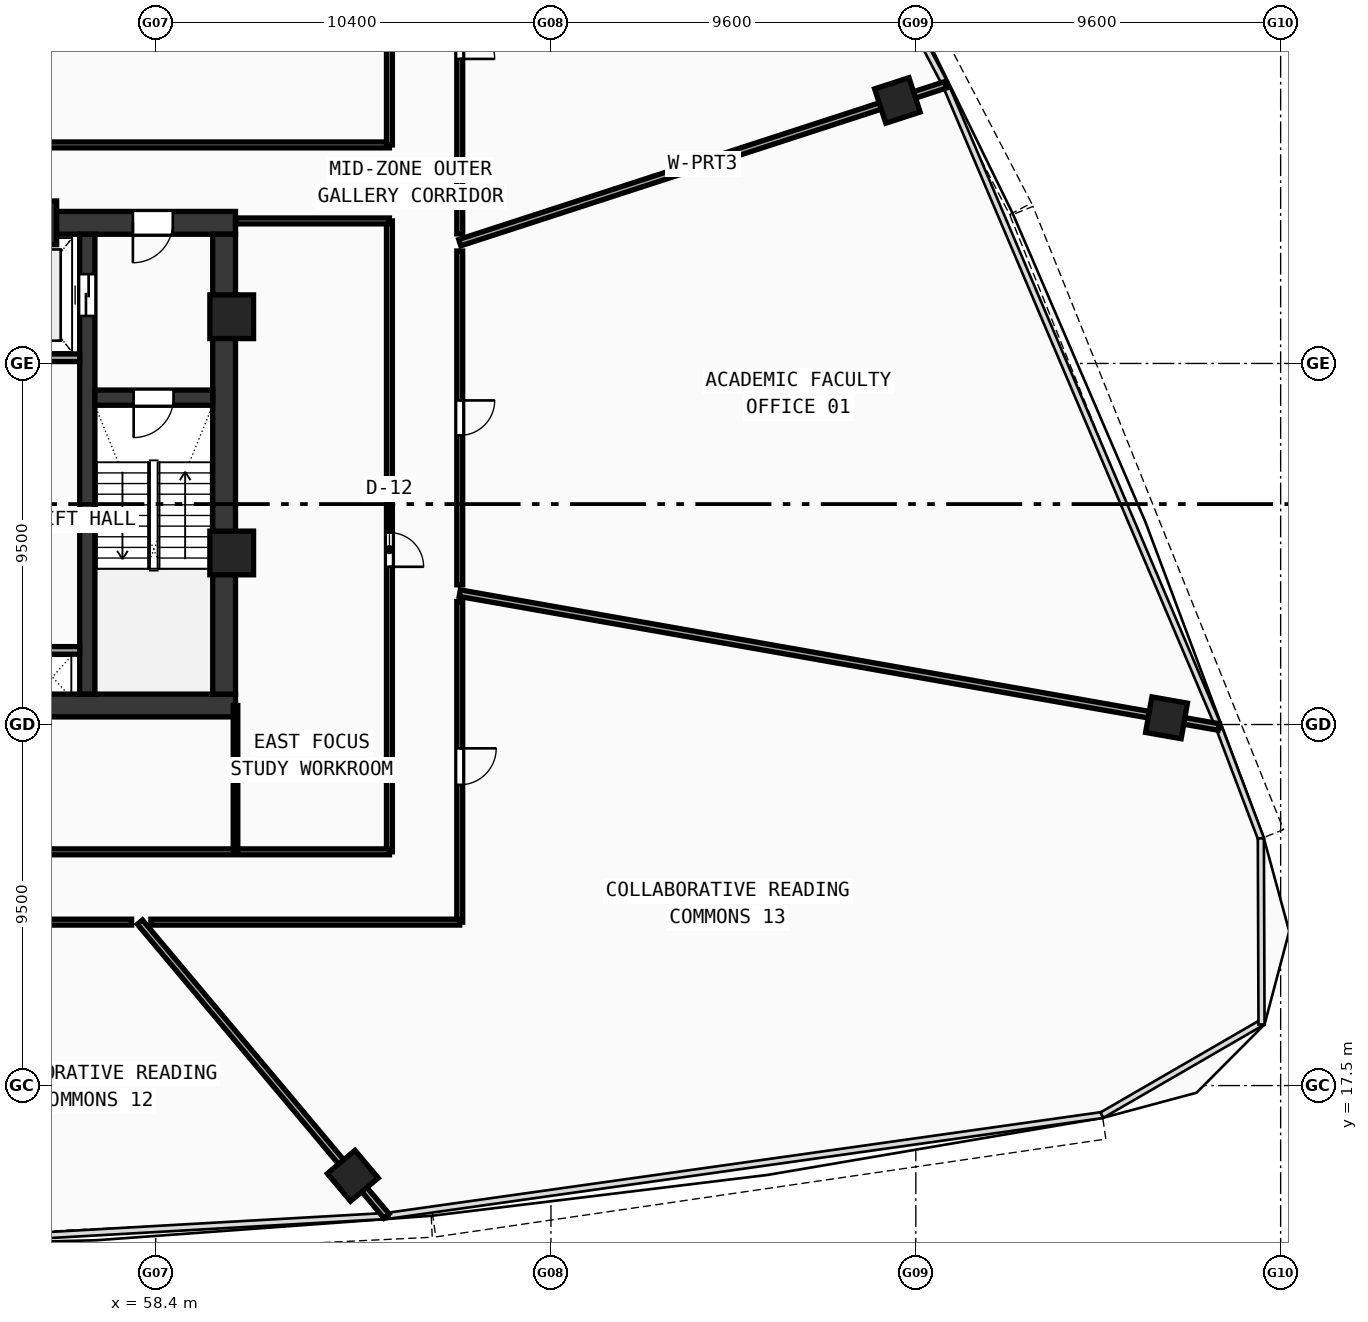
"""IFC4 building model, lengths in metres.
Left out: names, types, materials, properties, quantities, classifications, styles, units other than length and angle.
Written with IfcOpenShell. Run it as: python <this file> out.ifc"""

import sys

from ifc_helpers import new_model, si_unit, direction, frame, frame_2d, origin, origin_with_axes, origin_2d, place, context, subcontext, project, spatial, rectangle, hollow_rectangle, extrude, source, transform, mapped, element, fill, save


model = new_model("IFC4")
c1 = context("Model", 3, precision=1e-05, world=origin(), true_north=direction((0.0, 1.0)))
c2 = subcontext(c1, "Body", "Model", "MODEL_VIEW")
j1 = project(units=[si_unit("LENGTHUNIT", "METRE"), si_unit("PLANEANGLEUNIT", "RADIAN")], contexts=[c1])
p1 = place(None, origin())
s1 = spatial("IfcSite", under=j1, at=p1, CompositionType="ELEMENT")
p2 = place(p1, origin())
s2 = spatial("IfcBuilding", under=s1, at=p2, CompositionType="ELEMENT")
p3 = place(p2, frame((0.0, 0.0, 151.91)))
s3 = spatial("IfcBuildingStorey", under=s2, at=p3, CompositionType="ELEMENT", Elevation=151.91)
p4 = place(p3, frame((35.5, 27.5, 0.0), z_axis=(0.0, 0.0, 1.0), x_axis=(1.0, 0.0, 0.0)))
e1 = element("IfcWall", 1, at=p4, inside=s3, PredefinedType="SHEAR", context=c2, shape_type="SweptSolid", body=[
    extrude(rectangle(XDim=25.0, YDim=0.6, at=frame_2d((12.5, 0.0))), origin(), (0.0, 0.0, 1.0), 3.42),
])
p5 = place(p3, frame((49.2, 40.2, 0.0), z_axis=(0.0, 0.0, 1.0), x_axis=(1.0, 0.0, 0.0)))
e2 = element("IfcWall", 2, at=p5, inside=s3, PredefinedType="SHEAR", context=c2, shape_type="SweptSolid", body=[
    extrude(rectangle(XDim=11.3, YDim=0.6, at=frame_2d((5.65, 0.0))), origin(), (0.0, 0.0, 1.0), 3.42),
])
p6 = place(p5, frame((8.6, 0.0, 0.0)))
e3 = element("IfcOpeningElement", 3, at=p6, cuts=e2, PredefinedType="OPENING", context=c2, shape_type="SweptSolid", body=[
    extrude(rectangle(XDim=1.05, YDim=2.1, at=frame_2d((0.525, 1.05))), frame((0.0, 0.31, 0.0), z_axis=(0.0, -1.0, 0.0), x_axis=(1.0, 0.0, 0.0)), (0.0, 0.0, 1.0), 0.62),
])
p7 = place(p3, frame((60.2, 27.8, 0.0), z_axis=(0.0, 0.0, 1.0), x_axis=(0.0, 1.0, 0.0)))
e4 = element("IfcWall", 4, at=p7, inside=s3, PredefinedType="SHEAR", context=c2, shape_type="SweptSolid", body=[
    extrude(rectangle(XDim=12.1, YDim=0.6, at=frame_2d((6.05, 0.0))), origin(), (0.0, 0.0, 1.0), 3.42),
])
p8 = place(p3, frame((56.6, 27.8, 0.0), z_axis=(0.0, 0.0, 1.0), x_axis=(0.0, 1.0, 0.0)))
e5 = element("IfcWall", 5, at=p8, inside=s3, PredefinedType="SHEAR", context=c2, shape_type="SweptSolid", body=[
    extrude(rectangle(XDim=12.1, YDim=0.4, at=frame_2d((6.05, 0.0))), origin(), (0.0, 0.0, 1.0), 3.42),
])
p9 = place(p8, frame((9.95, 0.0, 0.0)))
e6 = element("IfcOpeningElement", 6, at=p9, cuts=e5, PredefinedType="OPENING", context=c2, shape_type="SweptSolid", body=[
    extrude(rectangle(XDim=1.1, YDim=2.1, at=frame_2d((0.55, 1.05))), frame((0.0, 0.21, 0.0), z_axis=(0.0, -1.0, 0.0), x_axis=(1.0, 0.0, 0.0)), (0.0, 0.0, 1.0), 0.42),
])
p10 = place(p3, frame((56.8, 35.6, 0.0), z_axis=(0.0, 0.0, 1.0), x_axis=(1.0, 0.0, 0.0)))
e7 = element("IfcWall", 7, at=p10, inside=s3, PredefinedType="SHEAR", context=c2, shape_type="SweptSolid", body=[
    extrude(rectangle(XDim=3.1, YDim=0.4, at=frame_2d((1.55, 0.0))), origin(), (0.0, 0.0, 1.0), 3.42),
])
p11 = place(p10, frame((1.02, 0.0, 0.0)))
e8 = element("IfcOpeningElement", 8, at=p11, cuts=e7, PredefinedType="OPENING", context=c2, shape_type="SweptSolid", body=[
    extrude(rectangle(XDim=1.05, YDim=2.1, at=frame_2d((0.525, 1.05))), frame((0.0, 0.21, 0.0), z_axis=(0.0, -1.0, 0.0), x_axis=(1.0, 0.0, 0.0)), (0.0, 0.0, 1.0), 0.42),
])
m1 = source(origin(), c2, "Body", "SweptSolid", [
    extrude(hollow_rectangle(XDim=1.15, YDim=1.15, WallThickness=0.048, at=origin_2d()), origin(), (0.0, 0.0, 1.0), 3.68),
])
for number, where, z_axis, x_axis in (
    (9, (60.4, 31.513, -0.26), (0.0, 0.0, 1.0), (1.0, 0.0, 0.0)),
    (10, (60.4, 37.729, -0.26), (0.0, 0.0, 1.0), (1.0, 0.0, 0.0)),
    (11, (55.219, 40.2, -0.26), (0.0, 0.0, 1.0), (1.0, 0.0, 0.0)),
):
    element("IfcColumn", number, at=place(p3, frame(where, z_axis=z_axis, x_axis=x_axis)), inside=s3, PredefinedType="COLUMN", context=c2, shape_type="MappedRepresentation", body=[
        mapped(m1, transform((0.0, 0.0, 0.0), scale=1.0)),
    ])
m2 = source(origin(), c2, "Body", "SweptSolid", [
    extrude(hollow_rectangle(XDim=0.95, YDim=0.95, WallThickness=0.04, at=origin_2d()), origin(), (0.0, 0.0, 1.0), 3.68),
])
for number, where, z_axis, x_axis in (
    (12, (63.585, 15.126, -0.26), (0.0, 0.0, 1.0), (0.766, 0.643, 0.0)),
    (13, (84.997, 27.177, -0.26), (0.0, 0.0, 1.0), (0.174, 0.985, 0.0)),
    (14, (77.915, 43.42, -0.26), (0.0, 0.0, 1.0), (-0.309, 0.951, 0.0)),
):
    element("IfcColumn", number, at=place(p3, frame(where, z_axis=z_axis, x_axis=x_axis)), inside=s3, PredefinedType="COLUMN", context=c2, shape_type="MappedRepresentation", body=[
        mapped(m2, transform((0.0, 0.0, 0.0), scale=1.0)),
    ])
p12 = place(p3, frame((53.68, 36.65, 0.0), z_axis=(0.0, 0.0, 1.0), x_axis=(1.0, 0.0, 0.0)))
e15 = element("IfcWall", 15, at=p12, inside=s3, PredefinedType="SOLIDWALL", context=c2, shape_type="SweptSolid", body=[
    extrude(rectangle(XDim=2.72, YDim=0.2, at=frame_2d((1.36, 0.0))), origin(), (0.0, 0.0, 1.0), 3.42),
])
p13 = place(p3, frame((55.12, 28.95, 0.0), z_axis=(0.0, 0.0, 1.0), x_axis=(1.0, 0.0, 0.0)))
e16 = element("IfcWall", 16, at=p13, inside=s3, PredefinedType="SOLIDWALL", context=c2, shape_type="SweptSolid", body=[
    extrude(rectangle(XDim=1.28, YDim=0.2, at=frame_2d((0.64, 0.0))), origin(), (0.0, 0.0, 1.0), 3.42),
])
p14 = place(p3, frame((31.45, 42.25, 0.0), z_axis=(0.0, 0.0, 1.0), x_axis=(1.0, 0.0, 0.0)))
e17 = element("IfcWall", 17, at=p14, inside=s3, PredefinedType="PARTITIONING", context=c2, shape_type="SweptSolid", body=[
    extrude(rectangle(XDim=33.1, YDim=0.155, at=frame_2d((16.55, 0.0))), origin(), (0.0, 0.0, 1.0), 2.77),
])
p15 = place(p3, frame((64.55, 42.25, 0.0), z_axis=(0.0, 0.0, 1.0), x_axis=(0.0, 1.0, 0.0)))
e18 = element("IfcWall", 18, at=p15, inside=s3, PredefinedType="PARTITIONING", context=c2, shape_type="SweptSolid", body=[
    extrude(rectangle(XDim=11.7, YDim=0.155, at=frame_2d((5.85, 0.0))), origin(), (0.0, 0.0, 1.0), 2.77),
])
p16 = place(p3, frame((64.55, 23.65, 0.0), z_axis=(0.0, 0.0, 1.0), x_axis=(0.0, 1.0, 0.0)))
e19 = element("IfcWall", 19, at=p16, inside=s3, PredefinedType="PARTITIONING", context=c2, shape_type="SweptSolid", body=[
    extrude(rectangle(XDim=16.6, YDim=0.155, at=frame_2d((8.3, 0.0))), origin(), (0.0, 0.0, 1.0), 2.77),
])
p17 = place(p16, frame((7.5, 0.0, 0.0)))
e20 = element("IfcOpeningElement", 20, at=p17, cuts=e19, PredefinedType="OPENING", context=c2, shape_type="SweptSolid", body=[
    extrude(rectangle(XDim=0.9, YDim=2.08, at=frame_2d((0.45, 1.04))), frame((0.0, 0.087, 0.0), z_axis=(0.0, -1.0, 0.0), x_axis=(1.0, 0.0, 0.0)), (0.0, 0.0, 1.0), 0.175),
])
p18 = place(p3, frame((31.45, 23.65, 0.0), z_axis=(0.0, 0.0, 1.0), x_axis=(1.0, 0.0, 0.0)))
e21 = element("IfcWall", 21, at=p18, inside=s3, PredefinedType="PARTITIONING", context=c2, shape_type="SweptSolid", body=[
    extrude(rectangle(XDim=33.1, YDim=0.155, at=frame_2d((16.55, 0.0))), origin(), (0.0, 0.0, 1.0), 2.77),
])
p19 = place(p18, frame((16.0, 0.0, 0.0)))
e22 = element("IfcOpeningElement", 22, at=p19, cuts=e21, PredefinedType="OPENING", context=c2, shape_type="SweptSolid", body=[
    extrude(rectangle(XDim=0.92, YDim=2.1, at=frame_2d((0.46, 1.05))), frame((0.0, 0.087, 0.0), z_axis=(0.0, -1.0, 0.0), x_axis=(1.0, 0.0, 0.0)), (0.0, 0.0, 1.0), 0.175),
])
p20 = place(p3, frame((60.5, 40.25, 0.0), z_axis=(0.0, 0.0, 1.0), x_axis=(1.0, 0.0, 0.0)))
e23 = element("IfcWall", 23, at=p20, inside=s3, PredefinedType="PARTITIONING", context=c2, shape_type="SweptSolid", body=[
    extrude(rectangle(XDim=4.05, YDim=0.155, at=frame_2d((2.025, 0.0))), origin(), (0.0, 0.0, 1.0), 3.42),
])
p21 = place(p3, frame((60.5, 23.65, 0.0), z_axis=(0.0, 0.0, 1.0), x_axis=(0.0, 1.0, 0.0)))
e24 = element("IfcWall", 24, at=p21, inside=s3, PredefinedType="PARTITIONING", context=c2, shape_type="SweptSolid", body=[
    extrude(rectangle(XDim=3.85, YDim=0.12, at=frame_2d((1.925, 0.0))), origin(), (0.0, 0.0, 1.0), 3.02),
])
p22 = place(p3, frame((66.4, 39.678, 0.0), z_axis=(0.0, 0.0, 1.0), x_axis=(0.951059027278, 0.309009266259, 0.0)))
e25 = element("IfcWall", 25, at=p22, inside=s3, PredefinedType="PARTITIONING", context=c2, shape_type="SweptSolid", body=[
    extrude(rectangle(XDim=13.441, YDim=0.175, at=frame_2d((6.72, 0.0))), origin(), (0.0, 0.0, 1.0), 2.77),
])
p23 = place(p3, frame((57.985, 21.8, 0.0), z_axis=(0.0, 0.0, 1.0), x_axis=(0.642793186641, -0.766039763464, 0.0)))
e26 = element("IfcWall", 26, at=p23, inside=s3, PredefinedType="PARTITIONING", context=c2, shape_type="SweptSolid", body=[
    extrude(rectangle(XDim=10.093, YDim=0.175, at=frame_2d((5.046, 0.0))), origin(), (0.0, 0.0, 1.0), 2.77),
])
p24 = place(p3, frame((66.4, 30.456, 0.0), z_axis=(0.0, 0.0, 1.0), x_axis=(0.98480815319, -0.173645908133, 0.0)))
e27 = element("IfcWall", 27, at=p24, inside=s3, PredefinedType="PARTITIONING", context=c2, shape_type="SweptSolid", body=[
    extrude(rectangle(XDim=20.278, YDim=0.175, at=frame_2d((10.139, 0.0))), origin(), (0.0, 0.0, 1.0), 2.77),
])
p25 = place(p3, frame((66.4, 50.048, 0.0), z_axis=(0.0, 0.0, 1.0), x_axis=(0.0, -1.0, 0.0)))
e28 = element("IfcWall", 28, at=p25, inside=s3, PredefinedType="PARTITIONING", context=c2, shape_type="SweptSolid", body=[
    extrude(rectangle(XDim=10.138, YDim=0.155, at=frame_2d((5.069, 0.0))), origin(), (0.0, 0.0, 1.0), 2.77),
])
p26 = place(p25, frame((4.615, 0.0, 0.0)))
e29 = element("IfcOpeningElement", 29, at=p26, cuts=e28, PredefinedType="OPENING", context=c2, shape_type="SweptSolid", body=[
    extrude(rectangle(XDim=0.92, YDim=2.1, at=frame_2d((0.46, 1.05))), frame((0.0, 0.087, 0.0), z_axis=(0.0, -1.0, 0.0), x_axis=(1.0, 0.0, 0.0)), (0.0, 0.0, 1.0), 0.175),
])
p27 = place(p3, frame((66.4, 39.459, 0.0), z_axis=(0.0, 0.0, 1.0), x_axis=(0.0, -1.0, 0.0)))
e30 = element("IfcWall", 30, at=p27, inside=s3, PredefinedType="PARTITIONING", context=c2, shape_type="SweptSolid", body=[
    extrude(rectangle(XDim=8.783, YDim=0.155, at=frame_2d((4.392, 0.0))), origin(), (0.0, 0.0, 1.0), 3.42),
])
p28 = place(p27, frame((3.932, 0.0, 0.0)))
e31 = element("IfcOpeningElement", 31, at=p28, cuts=e30, PredefinedType="OPENING", context=c2, shape_type="SweptSolid", body=[
    extrude(rectangle(XDim=0.92, YDim=2.1, at=frame_2d((0.46, 1.05))), frame((0.0, 0.087, 0.0), z_axis=(0.0, -1.0, 0.0), x_axis=(1.0, 0.0, 0.0)), (0.0, 0.0, 1.0), 0.175),
])
p29 = place(p3, frame((66.4, 30.232, 0.0), z_axis=(0.0, 0.0, 1.0), x_axis=(0.0, -1.0, 0.0)))
e32 = element("IfcWall", 32, at=p29, inside=s3, PredefinedType="PARTITIONING", context=c2, shape_type="SweptSolid", body=[
    extrude(rectangle(XDim=8.432, YDim=0.155, at=frame_2d((4.216, 0.0))), origin(), (0.0, 0.0, 1.0), 3.02),
])
p30 = place(p29, frame((3.859, 0.0, 0.0)))
e33 = element("IfcOpeningElement", 33, at=p30, cuts=e32, PredefinedType="OPENING", context=c2, shape_type="SweptSolid", body=[
    extrude(rectangle(XDim=0.96, YDim=2.12, at=frame_2d((0.48, 1.06))), frame((0.0, 0.087, 0.0), z_axis=(0.0, -1.0, 0.0), x_axis=(1.0, 0.0, 0.0)), (0.0, 0.0, 1.0), 0.175),
])
p31 = place(p3, frame((66.4, 21.8, 0.0), z_axis=(0.0, 0.0, 1.0), x_axis=(-1.0, 0.0, 0.0)))
e34 = element("IfcWall", 34, at=p31, inside=s3, PredefinedType="PARTITIONING", context=c2, shape_type="SweptSolid", body=[
    extrude(rectangle(XDim=8.127, YDim=0.155, at=frame_2d((4.064, 0.0))), origin(), (0.0, 0.0, 1.0), 3.02),
])
p32 = place(p3, frame((57.765, 21.8, 0.0), z_axis=(0.0, 0.0, 1.0), x_axis=(-1.0, 0.0, 0.0)))
e35 = element("IfcWall", 35, at=p32, inside=s3, PredefinedType="PARTITIONING", context=c2, shape_type="SweptSolid", body=[
    extrude(rectangle(XDim=6.349, YDim=0.155, at=frame_2d((3.174, 0.0))), origin(), (0.0, 0.0, 1.0), 2.77),
])
p33 = place(p32, frame((2.703, 0.0, 0.0)))
e36 = element("IfcOpeningElement", 36, at=p33, cuts=e35, PredefinedType="OPENING", context=c2, shape_type="SweptSolid", body=[
    extrude(rectangle(XDim=0.96, YDim=2.12, at=frame_2d((0.48, 1.06))), frame((0.0, 0.087, 0.0), z_axis=(0.0, -1.0, 0.0), x_axis=(1.0, 0.0, 0.0)), (0.0, 0.0, 1.0), 0.175),
])
m3 = source(origin(), c2, "Body", "SweptSolid", [
    extrude(rectangle(XDim=1.05, YDim=2.1, at=frame_2d((0.525, 1.05))), frame((0.0, 0.025, 0.0), z_axis=(0.0, -1.0, 0.0), x_axis=(1.0, 0.0, 0.0)), (0.0, 0.0, 1.0), 0.05),
])
p34 = place(p11, frame((1.05, 0.0, 0.0), z_axis=(0.0, 0.0, 1.0), x_axis=(-1.0, 0.0, 0.0)))
e37 = element("IfcDoor", 37, at=p34, inside=s3, OperationType="SINGLE_SWING_RIGHT", PredefinedType="DOOR", context=c2, shape_type="MappedRepresentation", body=[
    mapped(m3, transform((0.0, 0.0, 0.0), scale=1.0)),
])
fill(e8, e37)
p35 = place(p6, frame((1.05, 0.0, 0.0), z_axis=(0.0, 0.0, 1.0), x_axis=(-1.0, 0.0, 0.0)))
e38 = element("IfcDoor", 38, at=p35, inside=s3, OperationType="SINGLE_SWING_RIGHT", PredefinedType="DOOR", context=c2, shape_type="MappedRepresentation", body=[
    mapped(m3, transform((0.0, 0.0, 0.0), scale=1.0)),
])
fill(e3, e38)
m4 = source(origin(), c2, "Body", "SweptSolid", [
    extrude(rectangle(XDim=1.1, YDim=2.1, at=frame_2d((0.55, 1.05))), frame((0.0, 0.025, 0.0), z_axis=(0.0, -1.0, 0.0), x_axis=(1.0, 0.0, 0.0)), (0.0, 0.0, 1.0), 0.05),
])
p36 = place(p9, origin_with_axes())
e39 = element("IfcDoor", 39, at=p36, inside=s3, OperationType="DOUBLE_DOOR_SLIDING", PredefinedType="DOOR", context=c2, shape_type="MappedRepresentation", body=[
    mapped(m4, transform((0.0, 0.0, 0.0), scale=1.0)),
])
fill(e6, e39)
m5 = source(origin(), c2, "Body", "SweptSolid", [
    extrude(rectangle(XDim=0.9, YDim=2.08, at=frame_2d((0.45, 1.04))), frame((0.0, 0.025, 0.0), z_axis=(0.0, -1.0, 0.0), x_axis=(1.0, 0.0, 0.0)), (0.0, 0.0, 1.0), 0.05),
])
p37 = place(p17, frame((0.9, 0.0, 0.0), z_axis=(0.0, 0.0, 1.0), x_axis=(-1.0, 0.0, 0.0)))
e40 = element("IfcDoor", 40, at=p37, inside=s3, OperationType="SINGLE_SWING_RIGHT", PredefinedType="DOOR", context=c2, shape_type="MappedRepresentation", body=[
    mapped(m5, transform((0.0, 0.0, 0.0), scale=1.0)),
])
fill(e20, e40)
m6 = source(origin(), c2, "Body", "SweptSolid", [
    extrude(rectangle(XDim=0.92, YDim=2.1, at=frame_2d((0.46, 1.05))), frame((0.0, 0.025, 0.0), z_axis=(0.0, -1.0, 0.0), x_axis=(1.0, 0.0, 0.0)), (0.0, 0.0, 1.0), 0.05),
])
p38 = place(p28, origin_with_axes())
e41 = element("IfcDoor", 41, at=p38, inside=s3, OperationType="SINGLE_SWING_LEFT", PredefinedType="DOOR", context=c2, shape_type="MappedRepresentation", body=[
    mapped(m6, transform((0.0, 0.0, 0.0), scale=1.0)),
])
fill(e31, e41)
p39 = place(p26, origin_with_axes())
e42 = element("IfcDoor", 42, at=p39, inside=s3, OperationType="SINGLE_SWING_RIGHT", PredefinedType="DOOR", context=c2, shape_type="MappedRepresentation", body=[
    mapped(m6, transform((0.0, 0.0, 0.0), scale=1.0)),
])
fill(e29, e42)
m7 = source(origin(), c2, "Body", "SweptSolid", [
    extrude(rectangle(XDim=0.96, YDim=2.12, at=frame_2d((0.48, 1.06))), frame((0.0, 0.025, 0.0), z_axis=(0.0, -1.0, 0.0), x_axis=(1.0, 0.0, 0.0)), (0.0, 0.0, 1.0), 0.05),
])
p40 = place(p30, origin_with_axes())
e43 = element("IfcDoor", 43, at=p40, inside=s3, OperationType="SINGLE_SWING_LEFT", PredefinedType="DOOR", context=c2, shape_type="MappedRepresentation", body=[
    mapped(m7, transform((0.0, 0.0, 0.0), scale=1.0)),
])
fill(e33, e43)
save(model, sys.argv[1])
